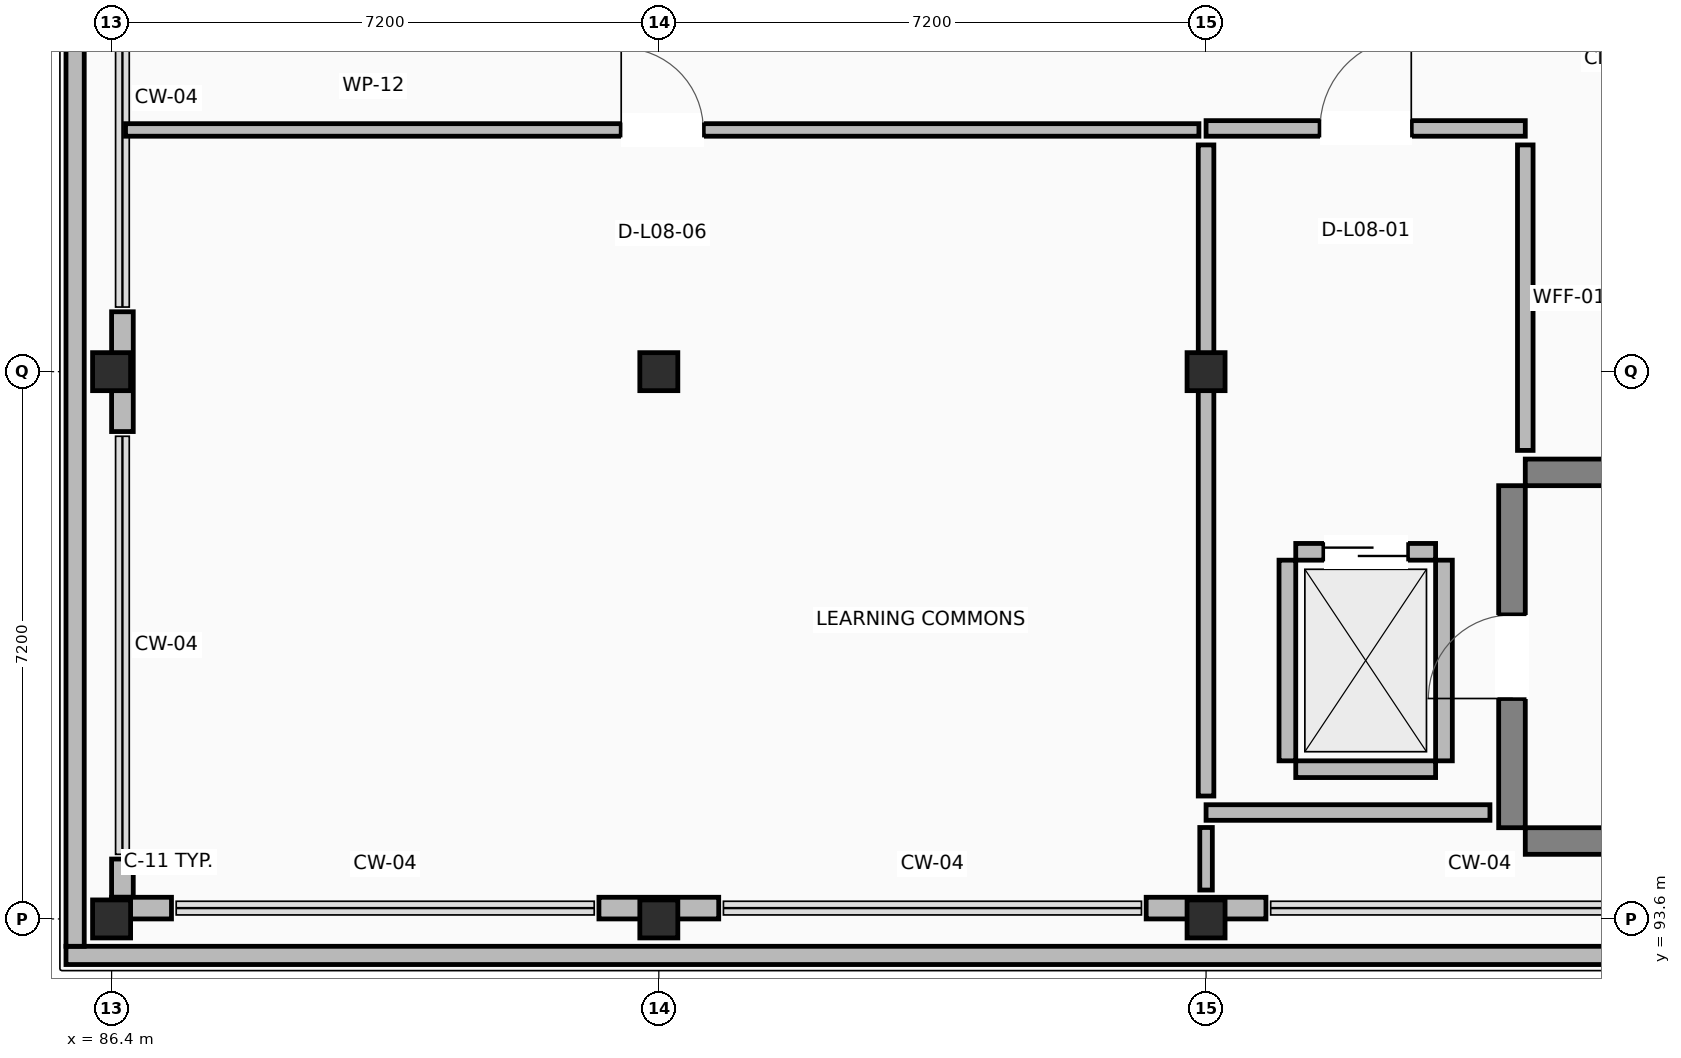
"""IFC4 building model, lengths in metres.
Left out: names, types, materials, properties, quantities, classifications, styles, units other than length and angle.
Written with IfcOpenShell. Run it as: python <this file> out.ifc"""

import sys

from ifc_helpers import new_model, si_unit, direction, frame, frame_2d, origin, origin_2d, place, context, subcontext, project, spatial, rectangle, extrude, element, fill, save


model = new_model("IFC4")
c1 = context("Model", 3, precision=1e-05, world=origin(), true_north=direction((0.0, 1.0)))
c2 = subcontext(c1, "Body", "Model", "MODEL_VIEW")
j1 = project(units=[si_unit("LENGTHUNIT", "METRE"), si_unit("PLANEANGLEUNIT", "RADIAN")], contexts=[c1])
p1 = place(None, origin())
s1 = spatial("IfcSite", under=j1, at=p1, CompositionType="ELEMENT")
p2 = place(p1, origin())
s2 = spatial("IfcBuilding", under=s1, at=p2, CompositionType="ELEMENT")
p3 = place(p2, frame((0.0, 0.0, 35.4)))
s3 = spatial("IfcBuildingStorey", under=s2, at=p3, CompositionType="ELEMENT", Elevation=35.4)
for number, where, z_axis, x_axis in (
    (1, (86.4, 93.6, 0.0), (0.0, 0.0, 1.0), (1.0, 0.0, 0.0)),
    (2, (86.4, 100.8, 0.0), (0.0, 0.0, 1.0), (1.0, 0.0, 0.0)),
    (3, (93.6, 93.6, 0.0), (0.0, 0.0, 1.0), (1.0, 0.0, 0.0)),
    (4, (93.6, 100.8, 0.0), (0.0, 0.0, 1.0), (1.0, 0.0, 0.0)),
    (5, (100.8, 93.6, 0.0), (0.0, 0.0, 1.0), (1.0, 0.0, 0.0)),
    (6, (100.8, 100.8, 0.0), (0.0, 0.0, 1.0), (1.0, 0.0, 0.0)),
):
    element("IfcColumn", number, at=place(p3, frame(where, z_axis=z_axis, x_axis=x_axis)), inside=s3, PredefinedType="COLUMN", context=c2, shape_type="SweptSolid", body=[
        extrude(rectangle(XDim=0.5, YDim=0.5, at=origin_2d()), origin(), (0.0, 0.0, 1.0), 3.92),
    ])
for number, where, z_axis, x_axis in (
    (7, (105.0, 94.625, 0.0), (0.0, 0.0, 1.0), (1.0, 0.0, 0.0)),
    (8, (105.0, 99.475, 0.0), (0.0, 0.0, 1.0), (1.0, 0.0, 0.0)),
):
    element("IfcWall", number, at=place(p3, frame(where, z_axis=z_axis, x_axis=x_axis)), inside=s3, PredefinedType="SHEAR", context=c2, shape_type="SweptSolid", body=[
        extrude(rectangle(XDim=9.5, YDim=0.35, at=frame_2d((4.75, 0.0))), origin(), (0.0, 0.0, 1.0), 3.92),
    ])
p4 = place(p3, frame((104.825, 94.8, 0.0), z_axis=(0.0, 0.0, 1.0), x_axis=(0.0, 1.0, 0.0)))
e9 = element("IfcWall", 9, at=p4, inside=s3, PredefinedType="SHEAR", context=c2, shape_type="SweptSolid", body=[
    extrude(rectangle(XDim=4.5, YDim=0.35, at=frame_2d((2.25, 0.0))), origin(), (0.0, 0.0, 1.0), 3.92),
])
p5 = place(p4, frame((1.7, 0.0, 0.0)))
e10 = element("IfcOpeningElement", 10, at=p5, cuts=e9, PredefinedType="OPENING", context=c2, shape_type="SweptSolid", body=[
    extrude(rectangle(XDim=1.1, YDim=2.15, at=frame_2d((0.55, 1.075))), frame((0.0, 0.185, 0.0), z_axis=(0.0, -1.0, 0.0), x_axis=(1.0, 0.0, 0.0)), (0.0, 0.0, 1.0), 0.37),
])
p6 = place(p3, frame((86.542, 101.588, 0.0), z_axis=(0.0, 0.0, 1.0), x_axis=(0.0, -1.0, 0.0)))
e11 = element("IfcWall", 11, at=p6, inside=s3, PredefinedType="STANDARD", context=c2, shape_type="SweptSolid", body=[
    extrude(rectangle(XDim=1.576, YDim=0.285, at=frame_2d((0.788, 0.0))), origin(), (0.0, 0.0, 1.0), 2.96),
])
p7 = place(p3, frame((86.542, 94.388, 0.0), z_axis=(0.0, 0.0, 1.0), x_axis=(0.0, -1.0, 0.0)))
e12 = element("IfcWall", 12, at=p7, inside=s3, PredefinedType="STANDARD", context=c2, shape_type="SweptSolid", body=[
    extrude(rectangle(XDim=0.503, YDim=0.285, at=frame_2d((0.251, 0.0))), origin(), (0.0, 0.0, 1.0), 2.96),
])
p8 = place(p3, frame((86.4, 93.742, 0.0), z_axis=(0.0, 0.0, 1.0), x_axis=(1.0, 0.0, 0.0)))
e13 = element("IfcWall", 13, at=p8, inside=s3, PredefinedType="STANDARD", context=c2, shape_type="SweptSolid", body=[
    extrude(rectangle(XDim=0.788, YDim=0.285, at=frame_2d((0.394, 0.0))), origin(), (0.0, 0.0, 1.0), 2.96),
])
for number, where, z_axis, x_axis in (
    (14, (92.812, 93.742, 0.0), (0.0, 0.0, 1.0), (1.0, 0.0, 0.0)),
    (15, (100.012, 93.742, 0.0), (0.0, 0.0, 1.0), (1.0, 0.0, 0.0)),
):
    element("IfcWall", number, at=place(p3, frame(where, z_axis=z_axis, x_axis=x_axis)), inside=s3, PredefinedType="STANDARD", context=c2, shape_type="SweptSolid", body=[
        extrude(rectangle(XDim=1.576, YDim=0.285, at=frame_2d((0.788, 0.0))), origin(), (0.0, 0.0, 1.0), 2.96),
    ])
p9 = place(p3, frame((136.44, 93.12, 0.0), z_axis=(0.0, 0.0, 1.0), x_axis=(-1.0, 0.0, 0.0)))
e16 = element("IfcWall", 16, at=p9, inside=s3, PredefinedType="PARAPET", context=c2, shape_type="SweptSolid", body=[
    extrude(rectangle(XDim=50.64, YDim=0.24, at=frame_2d((25.32, 0.0))), origin(), (0.0, 0.0, 1.0), 1.12),
])
p10 = place(p3, frame((85.92, 93.24, 0.0), z_axis=(0.0, 0.0, 1.0), x_axis=(0.0, 1.0, 0.0)))
e17 = element("IfcWall", 17, at=p10, inside=s3, PredefinedType="PARAPET", context=c2, shape_type="SweptSolid", body=[
    extrude(rectangle(XDim=22.32, YDim=0.24, at=frame_2d((11.16, 0.0))), origin(), (0.0, 0.0, 1.0), 1.12),
])
p11 = place(p3, frame((101.98, 95.57, 0.0), z_axis=(0.0, 0.0, 1.0), x_axis=(1.0, 0.0, 0.0)))
e18 = element("IfcWall", 18, at=p11, inside=s3, PredefinedType="STANDARD", context=c2, shape_type="SweptSolid", body=[
    extrude(rectangle(XDim=1.84, YDim=0.22, at=frame_2d((0.92, 0.0))), origin(), (0.0, 0.0, 1.0), 2.96),
])
p12 = place(p3, frame((101.98, 98.43, 0.0), z_axis=(0.0, 0.0, 1.0), x_axis=(1.0, 0.0, 0.0)))
e19 = element("IfcWall", 19, at=p12, inside=s3, PredefinedType="STANDARD", context=c2, shape_type="SweptSolid", body=[
    extrude(rectangle(XDim=1.84, YDim=0.22, at=frame_2d((0.92, 0.0))), origin(), (0.0, 0.0, 1.0), 2.96),
])
p13 = place(p12, frame((0.37, 0.0, 0.0)))
e20 = element("IfcOpeningElement", 20, at=p13, cuts=e19, PredefinedType="OPENING", context=c2, shape_type="SweptSolid", body=[
    extrude(rectangle(XDim=1.1, YDim=2.15, at=frame_2d((0.55, 1.075))), frame((0.0, 0.12, 0.0), z_axis=(0.0, -1.0, 0.0), x_axis=(1.0, 0.0, 0.0)), (0.0, 0.0, 1.0), 0.24),
])
for number, where, z_axis, x_axis in (
    (21, (101.87, 95.68, 0.0), (0.0, 0.0, 1.0), (0.0, 1.0, 0.0)),
    (22, (103.93, 95.68, 0.0), (0.0, 0.0, 1.0), (0.0, 1.0, 0.0)),
):
    element("IfcWall", number, at=place(p3, frame(where, z_axis=z_axis, x_axis=x_axis)), inside=s3, PredefinedType="STANDARD", context=c2, shape_type="SweptSolid", body=[
        extrude(rectangle(XDim=2.64, YDim=0.22, at=frame_2d((1.32, 0.0))), origin(), (0.0, 0.0, 1.0), 2.96),
    ])
p14 = place(p3, frame((100.8, 104.0, 0.0), z_axis=(0.0, 0.0, 1.0), x_axis=(1.0, 0.0, 0.0)))
e23 = element("IfcWall", 23, at=p14, inside=s3, PredefinedType="PARTITIONING", context=c2, shape_type="SweptSolid", body=[
    extrude(rectangle(XDim=4.2, YDim=0.205, at=frame_2d((2.1, 0.0))), origin(), (0.0, 0.0, 1.0), 2.96),
])
p15 = place(p14, frame((1.5, 0.0, 0.0)))
e24 = element("IfcOpeningElement", 24, at=p15, cuts=e23, PredefinedType="OPENING", context=c2, shape_type="SweptSolid", body=[
    extrude(rectangle(XDim=1.2, YDim=2.15, at=frame_2d((0.6, 1.075))), frame((0.0, 0.113, 0.0), z_axis=(0.0, -1.0, 0.0), x_axis=(1.0, 0.0, 0.0)), (0.0, 0.0, 1.0), 0.225),
])
p16 = place(p3, frame((105.0, 103.783, 0.0), z_axis=(0.0, 0.0, 1.0), x_axis=(0.0, -1.0, 0.0)))
e25 = element("IfcWall", 25, at=p16, inside=s3, PredefinedType="PARTITIONING", context=c2, shape_type="SweptSolid", body=[
    extrude(rectangle(XDim=4.019, YDim=0.205, at=frame_2d((2.01, 0.0))), origin(), (0.0, 0.0, 1.0), 2.96),
])
p17 = place(p3, frame((104.535, 95.0, 0.0), z_axis=(0.0, 0.0, 1.0), x_axis=(-1.0, 0.0, 0.0)))
e26 = element("IfcWall", 26, at=p17, inside=s3, PredefinedType="PARTITIONING", context=c2, shape_type="SweptSolid", body=[
    extrude(rectangle(XDim=3.735, YDim=0.205, at=frame_2d((1.867, 0.0))), origin(), (0.0, 0.0, 1.0), 2.96),
])
p18 = place(p3, frame((100.8, 95.217, 0.0), z_axis=(0.0, 0.0, 1.0), x_axis=(0.0, 1.0, 0.0)))
e27 = element("IfcWall", 27, at=p18, inside=s3, PredefinedType="PARTITIONING", context=c2, shape_type="SweptSolid", body=[
    extrude(rectangle(XDim=8.566, YDim=0.205, at=frame_2d((4.283, 0.0))), origin(), (0.0, 0.0, 1.0), 2.96),
])
p19 = place(p3, frame((86.583, 103.98, 0.0), z_axis=(0.0, 0.0, 1.0), x_axis=(1.0, 0.0, 0.0)))
e28 = element("IfcWall", 28, at=p19, inside=s3, PredefinedType="PARTITIONING", context=c2, shape_type="SweptSolid", body=[
    extrude(rectangle(XDim=14.123, YDim=0.165, at=frame_2d((7.062, 0.0))), origin(), (0.0, 0.0, 1.0), 2.96),
])
p20 = place(p19, frame((6.522, 0.0, 0.0)))
e29 = element("IfcOpeningElement", 29, at=p20, cuts=e28, PredefinedType="OPENING", context=c2, shape_type="SweptSolid", body=[
    extrude(rectangle(XDim=1.08, YDim=2.15, at=frame_2d((0.54, 1.075))), frame((0.0, 0.093, 0.0), z_axis=(0.0, -1.0, 0.0), x_axis=(1.0, 0.0, 0.0)), (0.0, 0.0, 1.0), 0.185),
])
p21 = place(p3, frame((100.8, 94.803, 0.0), z_axis=(0.0, 0.0, 1.0), x_axis=(0.0, -1.0, 0.0)))
e30 = element("IfcWall", 30, at=p21, inside=s3, PredefinedType="PARTITIONING", context=c2, shape_type="SweptSolid", body=[
    extrude(rectangle(XDim=0.823, YDim=0.165, at=frame_2d((0.412, 0.0))), origin(), (0.0, 0.0, 1.0), 2.96),
])
p22 = place(p5, origin())
e31 = element("IfcDoor", 31, at=p22, inside=s3, OperationType="SINGLE_SWING_LEFT", PredefinedType="DOOR", context=c2, shape_type="SweptSolid", body=[
    extrude(rectangle(XDim=1.1, YDim=2.15, at=frame_2d((0.55, 1.075))), frame((0.0, 0.025, 0.0), z_axis=(0.0, -1.0, 0.0), x_axis=(1.0, 0.0, 0.0)), (0.0, 0.0, 1.0), 0.05),
])
fill(e10, e31)
p23 = place(p13, origin())
e32 = element("IfcDoor", 32, at=p23, inside=s3, OperationType="SLIDING_TO_LEFT", PredefinedType="DOOR", context=c2, shape_type="SweptSolid", body=[
    extrude(rectangle(XDim=1.1, YDim=2.15, at=frame_2d((0.55, 1.075))), frame((0.0, 0.025, 0.0), z_axis=(0.0, -1.0, 0.0), x_axis=(1.0, 0.0, 0.0)), (0.0, 0.0, 1.0), 0.05),
])
fill(e20, e32)
p24 = place(p15, origin())
e33 = element("IfcDoor", 33, at=p24, inside=s3, OperationType="SINGLE_SWING_RIGHT", PredefinedType="DOOR", context=c2, shape_type="SweptSolid", body=[
    extrude(rectangle(XDim=1.2, YDim=2.15, at=frame_2d((0.6, 1.075))), frame((0.0, 0.025, 0.0), z_axis=(0.0, -1.0, 0.0), x_axis=(1.0, 0.0, 0.0)), (0.0, 0.0, 1.0), 0.05),
])
fill(e24, e33)
p25 = place(p20, origin())
e34 = element("IfcDoor", 34, at=p25, inside=s3, OperationType="SINGLE_SWING_LEFT", PredefinedType="DOOR", context=c2, shape_type="SweptSolid", body=[
    extrude(rectangle(XDim=1.08, YDim=2.15, at=frame_2d((0.54, 1.075))), frame((0.0, 0.025, 0.0), z_axis=(0.0, -1.0, 0.0), x_axis=(1.0, 0.0, 0.0)), (0.0, 0.0, 1.0), 0.05),
])
fill(e29, e34)
save(model, sys.argv[1])
